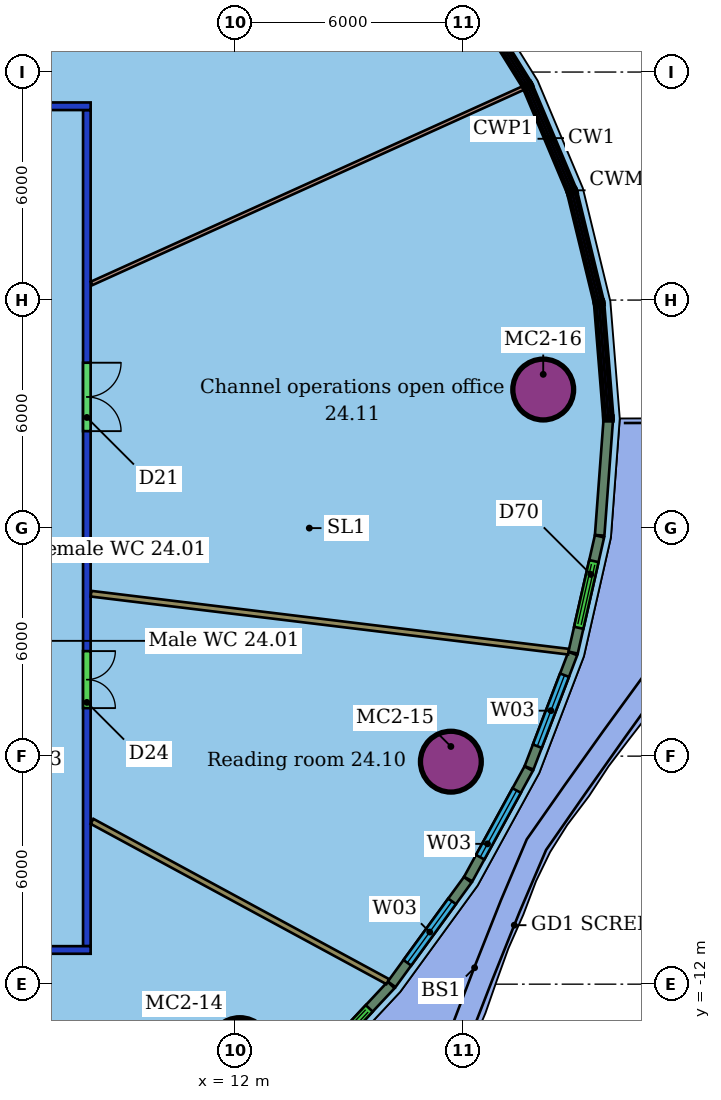
"""IFC4 building model, lengths in metres.
Left out: names, types, materials, properties, quantities, classifications, styles, units other than length and angle.
Written with IfcOpenShell. Run it as: python <this file> out.ifc"""

import sys

from ifc_helpers import new_model, si_unit, direction, frame, frame_2d, origin, origin_2d, place, context, subcontext, project, spatial, rectangle, hollow_circle, extrude, element, fill, save


model = new_model("IFC4")
c1 = context("Model", 3, precision=1e-05, world=origin(), true_north=direction((0.0, 1.0)))
c2 = subcontext(c1, "Body", "Model", "MODEL_VIEW")
j1 = project(units=[si_unit("LENGTHUNIT", "METRE"), si_unit("PLANEANGLEUNIT", "RADIAN")], contexts=[c1])
p1 = place(None, origin())
s1 = spatial("IfcSite", under=j1, at=p1, CompositionType="ELEMENT")
p2 = place(p1, origin())
s2 = spatial("IfcBuilding", under=s1, at=p2, CompositionType="ELEMENT")
p3 = place(p2, frame((0.0, 0.0, 106.6)))
s3 = spatial("IfcBuildingStorey", under=s2, at=p3, CompositionType="ELEMENT", Elevation=106.6)
for number, where, z_axis, x_axis in (
    (1, (12.125, -13.683, 0.0), (0.0, 0.0, 1.0), (1.0, 0.0, 0.0)),
    (2, (17.679, -6.146, 0.0), (0.0, 0.0, 1.0), (1.0, 0.0, 0.0)),
    (3, (20.109, 3.646, 0.0), (0.0, 0.0, 1.0), (1.0, 0.0, 0.0)),
):
    element("IfcColumn", number, at=place(p3, frame(where, z_axis=z_axis, x_axis=x_axis)), inside=s3, PredefinedType="COLUMN", context=c2, shape_type="SweptSolid", body=[
        extrude(hollow_circle(Radius=0.8, WallThickness=0.055, at=origin_2d()), origin(), (0.0, 0.0, 1.0), 3.45),
    ])
p4 = place(p3, frame((8.2, -11.1, 0.0), z_axis=(0.0, 0.0, 1.0), x_axis=(-1.0, 0.0, 0.0)))
e4 = element("IfcWall", 4, at=p4, inside=s3, PredefinedType="PARTITIONING", context=c2, shape_type="SweptSolid", body=[
    extrude(rectangle(XDim=28.4, YDim=0.2, at=frame_2d((14.2, 0.0))), origin(), (0.0, 0.0, 1.0), 3.0),
])
p5 = place(p4, frame((18.815, 0.0, 0.0)))
e5 = element("IfcOpeningElement", 5, at=p5, cuts=e4, PredefinedType="OPENING", context=c2, shape_type="SweptSolid", body=[
    extrude(rectangle(XDim=1.0, YDim=2.1, at=frame_2d((0.5, 1.05))), frame((0.0, 0.11, 0.0), z_axis=(0.0, -1.0, 0.0), x_axis=(1.0, 0.0, 0.0)), (0.0, 0.0, 1.0), 0.22),
])
p6 = place(p4, frame((9.712, 0.0, 0.0)))
e6 = element("IfcOpeningElement", 6, at=p6, cuts=e4, PredefinedType="OPENING", context=c2, shape_type="SweptSolid", body=[
    extrude(rectangle(XDim=1.8, YDim=2.1, at=frame_2d((0.9, 1.05))), frame((0.0, 0.11, 0.0), z_axis=(0.0, -1.0, 0.0), x_axis=(1.0, 0.0, 0.0)), (0.0, 0.0, 1.0), 0.22),
])
p7 = place(p3, frame((-20.2, 11.1, 0.0), z_axis=(0.0, 0.0, 1.0), x_axis=(1.0, 0.0, 0.0)))
e7 = element("IfcWall", 7, at=p7, inside=s3, PredefinedType="PARTITIONING", context=c2, shape_type="SweptSolid", body=[
    extrude(rectangle(XDim=28.4, YDim=0.2, at=frame_2d((14.2, 0.0))), origin(), (0.0, 0.0, 1.0), 3.0),
])
p8 = place(p7, frame((21.746, 0.0, 0.0)))
e8 = element("IfcOpeningElement", 8, at=p8, cuts=e7, PredefinedType="OPENING", context=c2, shape_type="SweptSolid", body=[
    extrude(rectangle(XDim=1.8, YDim=2.1, at=frame_2d((0.9, 1.05))), frame((0.0, 0.11, 0.0), z_axis=(0.0, -1.0, 0.0), x_axis=(1.0, 0.0, 0.0)), (0.0, 0.0, 1.0), 0.22),
])
p9 = place(p7, frame((15.894, 0.0, 0.0)))
e9 = element("IfcOpeningElement", 9, at=p9, cuts=e7, PredefinedType="OPENING", context=c2, shape_type="SweptSolid", body=[
    extrude(rectangle(XDim=1.0, YDim=2.1, at=frame_2d((0.5, 1.05))), frame((0.0, 0.11, 0.0), z_axis=(0.0, -1.0, 0.0), x_axis=(1.0, 0.0, 0.0)), (0.0, 0.0, 1.0), 0.22),
])
p10 = place(p7, frame((8.27, 0.0, 0.0)))
e10 = element("IfcOpeningElement", 10, at=p10, cuts=e7, PredefinedType="OPENING", context=c2, shape_type="SweptSolid", body=[
    extrude(rectangle(XDim=1.0, YDim=2.4, at=frame_2d((0.5, 1.2))), frame((0.0, 0.11, 0.0), z_axis=(0.0, -1.0, 0.0), x_axis=(1.0, 0.0, 0.0)), (0.0, 0.0, 1.0), 0.22),
])
p11 = place(p7, frame((3.349, 0.0, 0.0)))
e11 = element("IfcOpeningElement", 11, at=p11, cuts=e7, PredefinedType="OPENING", context=c2, shape_type="SweptSolid", body=[
    extrude(rectangle(XDim=0.9, YDim=2.1, at=frame_2d((0.45, 1.05))), frame((0.0, 0.11, 0.0), z_axis=(0.0, -1.0, 0.0), x_axis=(1.0, 0.0, 0.0)), (0.0, 0.0, 1.0), 0.22),
])
p12 = place(p3, frame((8.1, 11.0, 0.0), z_axis=(0.0, 0.0, 1.0), x_axis=(0.0, -1.0, 0.0)))
e12 = element("IfcWall", 12, at=p12, inside=s3, PredefinedType="PARTITIONING", context=c2, shape_type="SweptSolid", body=[
    extrude(rectangle(XDim=22.0, YDim=0.2, at=frame_2d((11.0, 0.0))), origin(), (0.0, 0.0, 1.0), 3.0),
])
p13 = place(p12, frame((14.236, 0.0, 0.0)))
e13 = element("IfcOpeningElement", 13, at=p13, cuts=e12, PredefinedType="OPENING", context=c2, shape_type="SweptSolid", body=[
    extrude(rectangle(XDim=1.5, YDim=2.1, at=frame_2d((0.75, 1.05))), frame((0.0, 0.11, 0.0), z_axis=(0.0, -1.0, 0.0), x_axis=(1.0, 0.0, 0.0)), (0.0, 0.0, 1.0), 0.22),
])
p14 = place(p12, frame((6.648, 0.0, 0.0)))
e14 = element("IfcOpeningElement", 14, at=p14, cuts=e12, PredefinedType="OPENING", context=c2, shape_type="SweptSolid", body=[
    extrude(rectangle(XDim=1.8, YDim=2.1, at=frame_2d((0.9, 1.05))), frame((0.0, 0.11, 0.0), z_axis=(0.0, -1.0, 0.0), x_axis=(1.0, 0.0, 0.0)), (0.0, 0.0, 1.0), 0.22),
])
p15 = place(p3, frame((19.584, 11.58, 0.0), z_axis=(0.0, 0.0, 1.0), x_axis=(-0.911028274582, -0.412343889142, 0.0)))
e15 = element("IfcWall", 15, at=p15, inside=s3, PredefinedType="PARTITIONING", context=c2, shape_type="SweptSolid", body=[
    extrude(rectangle(XDim=12.473, YDim=0.1, at=frame_2d((6.236, 0.0))), origin(), (0.0, 0.0, 1.0), 3.45),
])
p16 = place(p3, frame((16.018, -11.933, 0.0), z_axis=(0.0, 0.0, 1.0), x_axis=(-0.879177388761, 0.476494616015, 0.0)))
e16 = element("IfcWall", 16, at=p16, inside=s3, PredefinedType="PARTITIONING", context=c2, shape_type="SweptSolid", body=[
    extrude(rectangle(XDim=8.851, YDim=0.15, at=frame_2d((4.426, 0.0))), origin(), (0.0, 0.0, 1.0), 3.45),
])
p17 = place(p3, frame((20.772, -3.251, 0.0), z_axis=(0.0, 0.0, 1.0), x_axis=(-0.992705123228, 0.120567567434, 0.0)))
e17 = element("IfcWall", 17, at=p17, inside=s3, PredefinedType="PARTITIONING", context=c2, shape_type="SweptSolid", body=[
    extrude(rectangle(XDim=12.656, YDim=0.15, at=frame_2d((6.328, 0.0))), origin(), (0.0, 0.0, 1.0), 3.45),
])
p18 = place(p3, frame((13.726, -14.568, 0.0), z_axis=(0.0, 0.0, 1.0), x_axis=(0.68271241641, 0.730687181002, 0.0)))
e18 = element("IfcWall", 18, at=p18, inside=s3, PredefinedType="SOLIDWALL", context=c2, shape_type="SweptSolid", body=[
    extrude(rectangle(XDim=3.486, YDim=0.25, at=frame_2d((1.743, 0.0))), origin(), (0.0, 0.0, 1.0), 3.05),
])
p19 = place(p18, frame((0.843, 0.0, 0.0)))
e19 = element("IfcOpeningElement", 19, at=p19, cuts=e18, PredefinedType="OPENING", context=c2, shape_type="SweptSolid", body=[
    extrude(rectangle(XDim=1.8, YDim=2.4, at=frame_2d((0.9, 1.2))), frame((0.0, 0.135, 0.0), z_axis=(0.0, -1.0, 0.0), x_axis=(1.0, 0.0, 0.0)), (0.0, 0.0, 1.0), 0.27),
])
p20 = place(p3, frame((16.121, -12.003, 0.0), z_axis=(0.0, 0.0, 1.0), x_axis=(0.588602739614, 0.808422423563, 0.0)))
e20 = element("IfcWall", 20, at=p20, inside=s3, PredefinedType="SOLIDWALL", context=c2, shape_type="SweptSolid", body=[
    extrude(rectangle(XDim=3.401, YDim=0.25, at=frame_2d((1.7, 0.0))), origin(), (0.0, 0.0, 1.0), 3.05),
])
p21 = place(p20, frame((0.7, 0.0, 0.9)))
e21 = element("IfcOpeningElement", 21, at=p21, cuts=e20, PredefinedType="OPENING", context=c2, shape_type="SweptSolid", body=[
    extrude(rectangle(XDim=2.0, YDim=2.1, at=frame_2d((1.0, 1.05))), frame((0.0, 0.135, 0.0), z_axis=(0.0, -1.0, 0.0), x_axis=(1.0, 0.0, 0.0)), (0.0, 0.0, 1.0), 0.27),
])
p22 = place(p3, frame((18.135, -9.234, 0.0), z_axis=(0.0, 0.0, 1.0), x_axis=(0.48026734168, 0.877122158263, 0.0)))
e22 = element("IfcWall", 22, at=p22, inside=s3, PredefinedType="SOLIDWALL", context=c2, shape_type="SweptSolid", body=[
    extrude(rectangle(XDim=3.31, YDim=0.25, at=frame_2d((1.655, 0.0))), origin(), (0.0, 0.0, 1.0), 3.05),
])
p23 = place(p22, frame((0.655, 0.0, 0.9)))
e23 = element("IfcOpeningElement", 23, at=p23, cuts=e22, PredefinedType="OPENING", context=c2, shape_type="SweptSolid", body=[
    extrude(rectangle(XDim=2.0, YDim=2.1, at=frame_2d((1.0, 1.05))), frame((0.0, 0.135, 0.0), z_axis=(0.0, -1.0, 0.0), x_axis=(1.0, 0.0, 0.0)), (0.0, 0.0, 1.0), 0.27),
])
p24 = place(p3, frame((19.736, -6.307, 0.0), z_axis=(0.0, 0.0, 1.0), x_axis=(0.357678213507, 0.933844899104, 0.0)))
e24 = element("IfcWall", 24, at=p24, inside=s3, PredefinedType="SOLIDWALL", context=c2, shape_type="SweptSolid", body=[
    extrude(rectangle(XDim=3.22, YDim=0.25, at=frame_2d((1.61, 0.0))), origin(), (0.0, 0.0, 1.0), 3.05),
])
p25 = place(p24, frame((0.61, 0.0, 0.9)))
e25 = element("IfcOpeningElement", 25, at=p25, cuts=e24, PredefinedType="OPENING", context=c2, shape_type="SweptSolid", body=[
    extrude(rectangle(XDim=2.0, YDim=2.1, at=frame_2d((1.0, 1.05))), frame((0.0, 0.135, 0.0), z_axis=(0.0, -1.0, 0.0), x_axis=(1.0, 0.0, 0.0)), (0.0, 0.0, 1.0), 0.27),
])
p26 = place(p3, frame((20.895, -3.275, 0.0), z_axis=(0.0, 0.0, 1.0), x_axis=(0.221533658601, 0.975152725529, 0.0)))
e26 = element("IfcWall", 26, at=p26, inside=s3, PredefinedType="SOLIDWALL", context=c2, shape_type="SweptSolid", body=[
    extrude(rectangle(XDim=3.137, YDim=0.25, at=frame_2d((1.569, 0.0))), origin(), (0.0, 0.0, 1.0), 3.05),
])
p27 = place(p26, frame((0.669, 0.0, 0.0)))
e27 = element("IfcOpeningElement", 27, at=p27, cuts=e26, PredefinedType="OPENING", context=c2, shape_type="SweptSolid", body=[
    extrude(rectangle(XDim=1.8, YDim=2.4, at=frame_2d((0.9, 1.2))), frame((0.0, 0.135, 0.0), z_axis=(0.0, -1.0, 0.0), x_axis=(1.0, 0.0, 0.0)), (0.0, 0.0, 1.0), 0.27),
])
p28 = place(p3, frame((21.594, -0.189, 0.0), z_axis=(0.0, 0.0, 1.0), x_axis=(0.074290620375, 0.997236633766, 0.0)))
e28 = element("IfcWall", 28, at=p28, inside=s3, PredefinedType="SOLIDWALL", context=c2, shape_type="SweptSolid", body=[
    extrude(rectangle(XDim=3.027, YDim=0.25, at=frame_2d((1.513, 0.0))), origin(), (0.0, 0.0, 1.0), 3.05),
])
p29 = place(p13, origin())
e29 = element("IfcDoor", 29, at=p29, inside=s3, OperationType="DOUBLE_DOOR_SINGLE_SWING", PredefinedType="DOOR", context=c2, shape_type="SweptSolid", body=[
    extrude(rectangle(XDim=1.5, YDim=2.1, at=frame_2d((0.75, 1.05))), frame((0.0, 0.025, 0.0), z_axis=(0.0, -1.0, 0.0), x_axis=(1.0, 0.0, 0.0)), (0.0, 0.0, 1.0), 0.05),
])
fill(e13, e29)
p30 = place(p14, origin())
e30 = element("IfcDoor", 30, at=p30, inside=s3, OperationType="DOUBLE_DOOR_SINGLE_SWING", PredefinedType="DOOR", context=c2, shape_type="SweptSolid", body=[
    extrude(rectangle(XDim=1.8, YDim=2.1, at=frame_2d((0.9, 1.05))), frame((0.0, 0.025, 0.0), z_axis=(0.0, -1.0, 0.0), x_axis=(1.0, 0.0, 0.0)), (0.0, 0.0, 1.0), 0.05),
])
fill(e14, e30)
p31 = place(p19, origin())
e31 = element("IfcDoor", 31, at=p31, inside=s3, OperationType="DOUBLE_DOOR_SLIDING", PredefinedType="DOOR", context=c2, shape_type="SweptSolid", body=[
    extrude(rectangle(XDim=1.8, YDim=2.4, at=frame_2d((0.9, 1.2))), frame((0.0, 0.025, 0.0), z_axis=(0.0, -1.0, 0.0), x_axis=(1.0, 0.0, 0.0)), (0.0, 0.0, 1.0), 0.05),
])
fill(e19, e31)
p32 = place(p21, origin())
e32 = element("IfcWindow", 32, at=p32, inside=s3, PartitioningType="SINGLE_PANEL", PredefinedType="WINDOW", context=c2, shape_type="SweptSolid", body=[
    extrude(rectangle(XDim=2.0, YDim=2.1, at=frame_2d((1.0, 1.05))), frame((0.0, 0.03, 0.0), z_axis=(0.0, -1.0, 0.0), x_axis=(1.0, 0.0, 0.0)), (0.0, 0.0, 1.0), 0.06),
])
fill(e21, e32)
p33 = place(p23, origin())
e33 = element("IfcWindow", 33, at=p33, inside=s3, PartitioningType="SINGLE_PANEL", PredefinedType="WINDOW", context=c2, shape_type="SweptSolid", body=[
    extrude(rectangle(XDim=2.0, YDim=2.1, at=frame_2d((1.0, 1.05))), frame((0.0, 0.03, 0.0), z_axis=(0.0, -1.0, 0.0), x_axis=(1.0, 0.0, 0.0)), (0.0, 0.0, 1.0), 0.06),
])
fill(e23, e33)
p34 = place(p25, origin())
e34 = element("IfcWindow", 34, at=p34, inside=s3, PartitioningType="SINGLE_PANEL", PredefinedType="WINDOW", context=c2, shape_type="SweptSolid", body=[
    extrude(rectangle(XDim=2.0, YDim=2.1, at=frame_2d((1.0, 1.05))), frame((0.0, 0.03, 0.0), z_axis=(0.0, -1.0, 0.0), x_axis=(1.0, 0.0, 0.0)), (0.0, 0.0, 1.0), 0.06),
])
fill(e25, e34)
p35 = place(p27, origin())
e35 = element("IfcDoor", 35, at=p35, inside=s3, OperationType="DOUBLE_DOOR_SLIDING", PredefinedType="DOOR", context=c2, shape_type="SweptSolid", body=[
    extrude(rectangle(XDim=1.8, YDim=2.4, at=frame_2d((0.9, 1.2))), frame((0.0, 0.025, 0.0), z_axis=(0.0, -1.0, 0.0), x_axis=(1.0, 0.0, 0.0)), (0.0, 0.0, 1.0), 0.05),
])
fill(e27, e35)
save(model, sys.argv[1])
